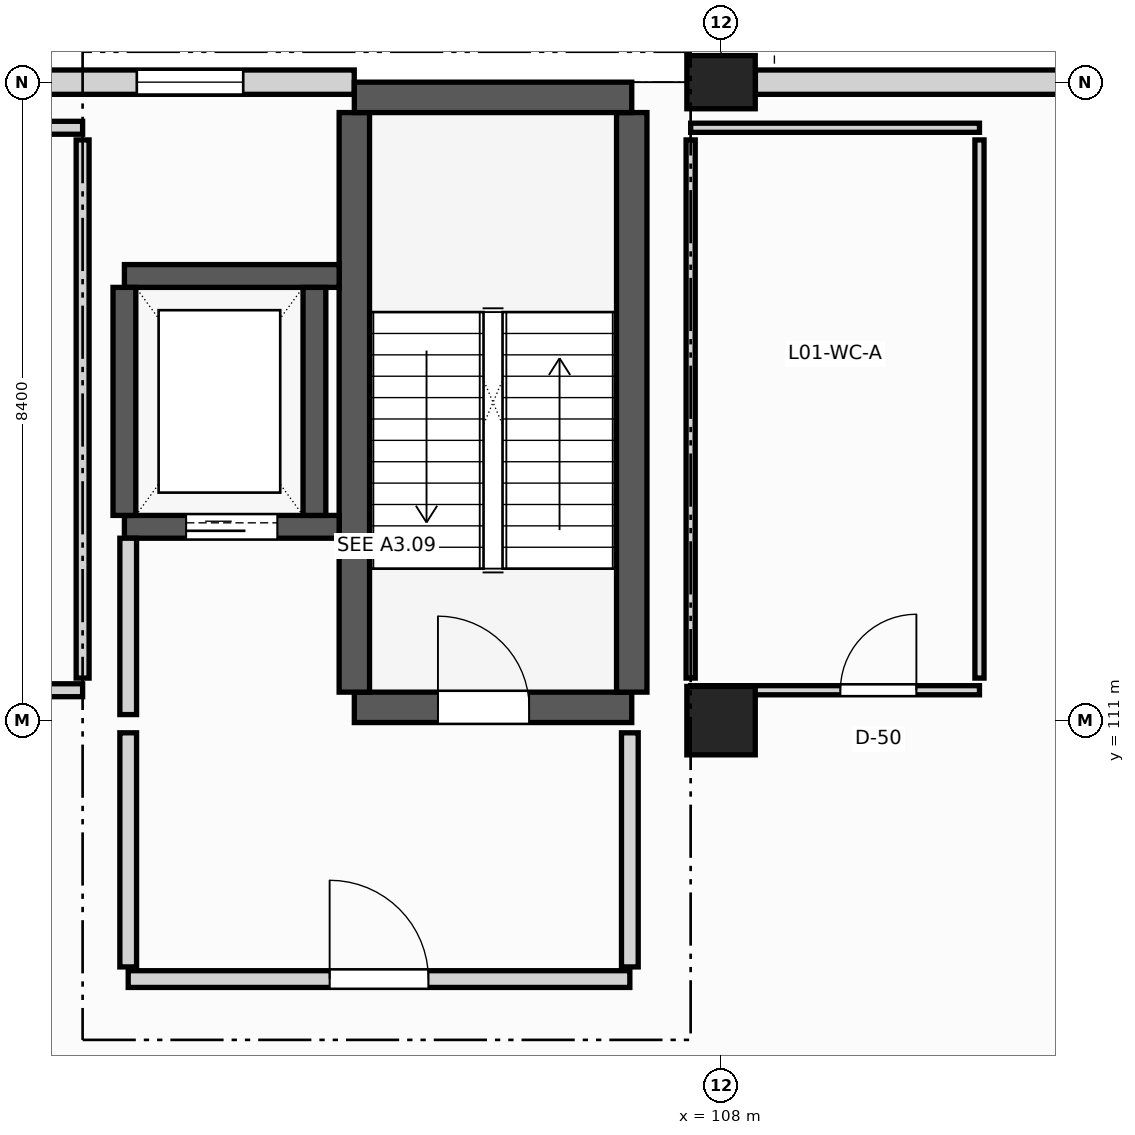
"""IFC4 building model, lengths in metres.
Left out: names, types, materials, properties, quantities, classifications, styles, units other than length and angle.
Written with IfcOpenShell. Run it as: python <this file> out.ifc"""

import sys

from ifc_helpers import new_model, si_unit, direction, frame, frame_2d, origin, origin_2d, place, context, subcontext, project, spatial, rectangle, extrude, element, fill, save


model = new_model("IFC4")
c1 = context("Model", 3, precision=1e-05, world=origin(), true_north=direction((0.0, 1.0)))
c2 = subcontext(c1, "Body", "Model", "MODEL_VIEW")
j1 = project(units=[si_unit("LENGTHUNIT", "METRE"), si_unit("PLANEANGLEUNIT", "RADIAN")], contexts=[c1])
p1 = place(None, origin())
s1 = spatial("IfcSite", under=j1, at=p1, CompositionType="ELEMENT")
p2 = place(p1, origin())
s2 = spatial("IfcBuilding", under=s1, at=p2, CompositionType="ELEMENT")
p3 = place(p2, frame((0.0, 0.0, 5.4)))
s3 = spatial("IfcBuildingStorey", under=s2, at=p3, CompositionType="ELEMENT", Elevation=5.4)
p4 = place(p3, frame((108.0, 111.0, 0.0), z_axis=(0.0, 0.0, 1.0), x_axis=(1.0, 0.0, 0.0)))
e1 = element("IfcColumn", 1, at=p4, inside=s3, PredefinedType="COLUMN", context=c2, shape_type="SweptSolid", body=[
    extrude(rectangle(XDim=0.9, YDim=0.9, at=origin_2d()), origin(), (0.0, 0.0, 1.0), 4.18),
])
p5 = place(p3, frame((108.0, 119.4, 0.0), z_axis=(0.0, 0.0, 1.0), x_axis=(1.0, 0.0, 0.0)))
e2 = element("IfcColumn", 2, at=p5, inside=s3, PredefinedType="COLUMN", context=c2, shape_type="SweptSolid", body=[
    extrude(rectangle(XDim=0.9, YDim=0.7, at=origin_2d()), origin(), (0.0, 0.0, 1.0), 4.18),
])
p6 = place(p3, frame((98.852, 119.4, 0.0), z_axis=(0.0, 0.0, 1.0), x_axis=(1.0, 0.0, 0.0)))
e3 = element("IfcWall", 3, at=p6, inside=s3, PredefinedType="SOLIDWALL", context=c2, shape_type="SweptSolid", body=[
    extrude(rectangle(XDim=4.322, YDim=0.32, at=frame_2d((2.161, 0.0))), origin(), (0.0, 0.0, 1.0), 3.38),
])
p7 = place(p6, frame((1.461, 0.0, 0.9)))
e4 = element("IfcOpeningElement", 4, at=p7, cuts=e3, PredefinedType="OPENING", context=c2, shape_type="SweptSolid", body=[
    extrude(rectangle(XDim=1.4, YDim=1.65, at=frame_2d((0.7, 0.825))), frame((0.0, 0.17, 0.0), z_axis=(0.0, -1.0, 0.0), x_axis=(1.0, 0.0, 0.0)), (0.0, 0.0, 1.0), 0.34),
])
p8 = place(p3, frame((108.452, 119.4, 0.0), z_axis=(0.0, 0.0, 1.0), x_axis=(1.0, 0.0, 0.0)))
e5 = element("IfcWall", 5, at=p8, inside=s3, PredefinedType="SOLIDWALL", context=c2, shape_type="SweptSolid", body=[
    extrude(rectangle(XDim=8.696, YDim=0.32, at=frame_2d((4.348, 0.0))), origin(), (0.0, 0.0, 1.0), 3.38),
])
p9 = place(p8, frame((5.648, 0.0, 0.85)))
e6 = element("IfcOpeningElement", 6, at=p9, cuts=e5, PredefinedType="OPENING", context=c2, shape_type="SweptSolid", body=[
    extrude(rectangle(XDim=1.4, YDim=1.65, at=frame_2d((0.7, 0.825))), frame((0.0, 0.17, 0.0), z_axis=(0.0, -1.0, 0.0), x_axis=(1.0, 0.0, 0.0)), (0.0, 0.0, 1.0), 0.34),
])
p10 = place(p3, frame((103.175, 111.175, 0.0), z_axis=(0.0, 0.0, 1.0), x_axis=(1.0, 0.0, 0.0)))
e7 = element("IfcWall", 7, at=p10, inside=s3, PredefinedType="SHEAR", context=c2, shape_type="SweptSolid", body=[
    extrude(rectangle(XDim=3.65, YDim=0.4, at=frame_2d((1.825, 0.0))), origin(), (0.0, 0.0, 1.0), 4.18),
])
p11 = place(p10, frame((1.1, 0.0, 0.0)))
e8 = element("IfcOpeningElement", 8, at=p11, cuts=e7, PredefinedType="OPENING", context=c2, shape_type="SweptSolid", body=[
    extrude(rectangle(XDim=1.2, YDim=2.2, at=frame_2d((0.6, 1.1))), frame((0.0, 0.21, 0.0), z_axis=(0.0, -1.0, 0.0), x_axis=(1.0, 0.0, 0.0)), (0.0, 0.0, 1.0), 0.42),
])
for number, where, z_axis, x_axis in (
    (9, (103.175, 111.375, 0.0), (0.0, 0.0, 1.0), (0.0, 1.0, 0.0)),
    (10, (106.825, 111.375, 0.0), (0.0, 0.0, 1.0), (0.0, 1.0, 0.0)),
):
    element("IfcWall", number, at=place(p3, frame(where, z_axis=z_axis, x_axis=x_axis)), inside=s3, PredefinedType="SHEAR", context=c2, shape_type="SweptSolid", body=[
        extrude(rectangle(XDim=7.625, YDim=0.4, at=frame_2d((3.812, 0.0))), origin(), (0.0, 0.0, 1.0), 4.18),
    ])
p12 = place(p3, frame((103.175, 119.2, 0.0), z_axis=(0.0, 0.0, 1.0), x_axis=(1.0, 0.0, 0.0)))
e11 = element("IfcWall", 11, at=p12, inside=s3, PredefinedType="SHEAR", context=c2, shape_type="SweptSolid", body=[
    extrude(rectangle(XDim=3.65, YDim=0.4, at=frame_2d((1.825, 0.0))), origin(), (0.0, 0.0, 1.0), 4.18),
])
p13 = place(p3, frame((100.15, 113.55, 0.0), z_axis=(0.0, 0.0, 1.0), x_axis=(1.0, 0.0, 0.0)))
e12 = element("IfcWall", 12, at=p13, inside=s3, PredefinedType="SHEAR", context=c2, shape_type="SweptSolid", body=[
    extrude(rectangle(XDim=2.825, YDim=0.3, at=frame_2d((1.413, 0.0))), origin(), (0.0, 0.0, 1.0), 4.18),
])
p14 = place(p13, frame((0.812, 0.0, 0.0)))
e13 = element("IfcOpeningElement", 13, at=p14, cuts=e12, PredefinedType="OPENING", context=c2, shape_type="SweptSolid", body=[
    extrude(rectangle(XDim=1.2, YDim=2.2, at=frame_2d((0.6, 1.1))), frame((0.0, 0.16, 0.0), z_axis=(0.0, -1.0, 0.0), x_axis=(1.0, 0.0, 0.0)), (0.0, 0.0, 1.0), 0.32),
])
p15 = place(p3, frame((100.15, 116.85, 0.0), z_axis=(0.0, 0.0, 1.0), x_axis=(1.0, 0.0, 0.0)))
e14 = element("IfcWall", 14, at=p15, inside=s3, PredefinedType="SHEAR", context=c2, shape_type="SweptSolid", body=[
    extrude(rectangle(XDim=2.825, YDim=0.3, at=frame_2d((1.413, 0.0))), origin(), (0.0, 0.0, 1.0), 4.18),
])
for number, where, z_axis, x_axis in (
    (15, (100.15, 113.7, 0.0), (0.0, 0.0, 1.0), (0.0, 1.0, 0.0)),
    (16, (102.65, 113.7, 0.0), (0.0, 0.0, 1.0), (0.0, 1.0, 0.0)),
):
    element("IfcWall", number, at=place(p3, frame(where, z_axis=z_axis, x_axis=x_axis)), inside=s3, PredefinedType="SHEAR", context=c2, shape_type="SweptSolid", body=[
        extrude(rectangle(XDim=3.0, YDim=0.3, at=frame_2d((1.5, 0.0))), origin(), (0.0, 0.0, 1.0), 4.18),
    ])
p16 = place(p3, frame((100.2, 107.6, 0.0), z_axis=(0.0, 0.0, 1.0), x_axis=(1.0, 0.0, 0.0)))
e17 = element("IfcWall", 17, at=p16, inside=s3, PredefinedType="PARTITIONING", context=c2, shape_type="SweptSolid", body=[
    extrude(rectangle(XDim=6.6, YDim=0.22, at=frame_2d((3.3, 0.0))), origin(), (0.0, 0.0, 1.0), 3.22),
])
p17 = place(p16, frame((2.65, 0.0, 0.0)))
e18 = element("IfcOpeningElement", 18, at=p17, cuts=e17, PredefinedType="OPENING", context=c2, shape_type="SweptSolid", body=[
    extrude(rectangle(XDim=1.3, YDim=2.2, at=frame_2d((0.65, 1.1))), frame((0.0, 0.12, 0.0), z_axis=(0.0, -1.0, 0.0), x_axis=(1.0, 0.0, 0.0)), (0.0, 0.0, 1.0), 0.24),
])
p18 = place(p3, frame((100.2, 111.08, 0.0), z_axis=(0.0, 0.0, 1.0), x_axis=(0.0, 1.0, 0.0)))
e19 = element("IfcWall", 19, at=p18, inside=s3, PredefinedType="PARTITIONING", context=c2, shape_type="SweptSolid", body=[
    extrude(rectangle(XDim=2.32, YDim=0.22, at=frame_2d((1.16, 0.0))), origin(), (0.0, 0.0, 1.0), 3.22),
])
for number, where, z_axis, x_axis in (
    (20, (100.2, 107.76, 0.0), (0.0, 0.0, 1.0), (0.0, 1.0, 0.0)),
    (21, (106.8, 107.76, 0.0), (0.0, 0.0, 1.0), (0.0, 1.0, 0.0)),
):
    element("IfcWall", number, at=place(p3, frame(where, z_axis=z_axis, x_axis=x_axis)), inside=s3, PredefinedType="PARTITIONING", context=c2, shape_type="SweptSolid", body=[
        extrude(rectangle(XDim=3.08, YDim=0.22, at=frame_2d((1.54, 0.0))), origin(), (0.0, 0.0, 1.0), 3.22),
    ])
p19 = place(p3, frame((78.2, 111.4, 0.0), z_axis=(0.0, 0.0, 1.0), x_axis=(1.0, 0.0, 0.0)))
e22 = element("IfcWall", 22, at=p19, inside=s3, PredefinedType="PARTITIONING", context=c2, shape_type="SweptSolid", body=[
    extrude(rectangle(XDim=21.4, YDim=0.17, at=frame_2d((10.7, 0.0))), origin(), (0.0, 0.0, 1.0), 3.22),
])
p20 = place(p19, frame((6.94, 0.0, 0.0)))
e23 = element("IfcOpeningElement", 23, at=p20, cuts=e22, PredefinedType="OPENING", context=c2, shape_type="SweptSolid", body=[
    extrude(rectangle(XDim=1.1, YDim=2.2, at=frame_2d((0.55, 1.1))), frame((0.0, 0.095, 0.0), z_axis=(0.0, -1.0, 0.0), x_axis=(1.0, 0.0, 0.0)), (0.0, 0.0, 1.0), 0.19),
])
p21 = place(p3, frame((78.2, 118.8, 0.0), z_axis=(0.0, 0.0, 1.0), x_axis=(1.0, 0.0, 0.0)))
e24 = element("IfcWall", 24, at=p21, inside=s3, PredefinedType="PARTITIONING", context=c2, shape_type="SweptSolid", body=[
    extrude(rectangle(XDim=21.4, YDim=0.17, at=frame_2d((10.7, 0.0))), origin(), (0.0, 0.0, 1.0), 3.22),
])
p22 = place(p3, frame((99.6, 111.56, 0.0), z_axis=(0.0, 0.0, 1.0), x_axis=(0.0, 1.0, 0.0)))
e25 = element("IfcWall", 25, at=p22, inside=s3, PredefinedType="PARTITIONING", context=c2, shape_type="SweptSolid", body=[
    extrude(rectangle(XDim=7.08, YDim=0.17, at=frame_2d((3.54, 0.0))), origin(), (0.0, 0.0, 1.0), 3.22),
])
p23 = place(p3, frame((107.6, 111.4, 0.0), z_axis=(0.0, 0.0, 1.0), x_axis=(1.0, 0.0, 0.0)))
e26 = element("IfcWall", 26, at=p23, inside=s3, PredefinedType="PARTITIONING", context=c2, shape_type="SweptSolid", body=[
    extrude(rectangle(XDim=3.8, YDim=0.12, at=frame_2d((1.9, 0.0))), origin(), (0.0, 0.0, 1.0), 3.22),
])
p24 = place(p23, frame((1.97, 0.0, 0.0)))
e27 = element("IfcOpeningElement", 27, at=p24, cuts=e26, PredefinedType="OPENING", context=c2, shape_type="SweptSolid", body=[
    extrude(rectangle(XDim=1.0, YDim=2.15, at=frame_2d((0.5, 1.075))), frame((0.0, 0.07, 0.0), z_axis=(0.0, -1.0, 0.0), x_axis=(1.0, 0.0, 0.0)), (0.0, 0.0, 1.0), 0.14),
])
p25 = place(p3, frame((107.6, 118.8, 0.0), z_axis=(0.0, 0.0, 1.0), x_axis=(1.0, 0.0, 0.0)))
e28 = element("IfcWall", 28, at=p25, inside=s3, PredefinedType="PARTITIONING", context=c2, shape_type="SweptSolid", body=[
    extrude(rectangle(XDim=3.8, YDim=0.12, at=frame_2d((1.9, 0.0))), origin(), (0.0, 0.0, 1.0), 3.22),
])
for number, where, z_axis, x_axis in (
    (29, (107.6, 111.56, 0.0), (0.0, 0.0, 1.0), (0.0, 1.0, 0.0)),
    (30, (111.4, 111.56, 0.0), (0.0, 0.0, 1.0), (0.0, 1.0, 0.0)),
):
    element("IfcWall", number, at=place(p3, frame(where, z_axis=z_axis, x_axis=x_axis)), inside=s3, PredefinedType="PARTITIONING", context=c2, shape_type="SweptSolid", body=[
        extrude(rectangle(XDim=7.08, YDim=0.12, at=frame_2d((3.54, 0.0))), origin(), (0.0, 0.0, 1.0), 3.22),
    ])
p26 = place(p7, origin())
e31 = element("IfcWindow", 31, at=p26, inside=s3, PartitioningType="SINGLE_PANEL", PredefinedType="WINDOW", context=c2, shape_type="SweptSolid", body=[
    extrude(rectangle(XDim=1.4, YDim=1.65, at=frame_2d((0.7, 0.825))), frame((0.0, 0.03, 0.0), z_axis=(0.0, -1.0, 0.0), x_axis=(1.0, 0.0, 0.0)), (0.0, 0.0, 1.0), 0.06),
])
fill(e4, e31)
p27 = place(p11, origin())
e32 = element("IfcDoor", 32, at=p27, inside=s3, OperationType="SINGLE_SWING_LEFT", PredefinedType="DOOR", context=c2, shape_type="SweptSolid", body=[
    extrude(rectangle(XDim=1.2, YDim=2.2, at=frame_2d((0.6, 1.1))), frame((0.0, 0.025, 0.0), z_axis=(0.0, -1.0, 0.0), x_axis=(1.0, 0.0, 0.0)), (0.0, 0.0, 1.0), 0.05),
])
fill(e8, e32)
p28 = place(p14, origin())
e33 = element("IfcDoor", 33, at=p28, inside=s3, OperationType="SLIDING_TO_LEFT", PredefinedType="DOOR", context=c2, shape_type="SweptSolid", body=[
    extrude(rectangle(XDim=1.2, YDim=2.2, at=frame_2d((0.6, 1.1))), frame((0.0, 0.025, 0.0), z_axis=(0.0, -1.0, 0.0), x_axis=(1.0, 0.0, 0.0)), (0.0, 0.0, 1.0), 0.05),
])
fill(e13, e33)
p29 = place(p17, origin())
e34 = element("IfcDoor", 34, at=p29, inside=s3, OperationType="SINGLE_SWING_LEFT", PredefinedType="DOOR", context=c2, shape_type="SweptSolid", body=[
    extrude(rectangle(XDim=1.3, YDim=2.2, at=frame_2d((0.65, 1.1))), frame((0.0, 0.025, 0.0), z_axis=(0.0, -1.0, 0.0), x_axis=(1.0, 0.0, 0.0)), (0.0, 0.0, 1.0), 0.05),
])
fill(e18, e34)
p30 = place(p24, origin())
e35 = element("IfcDoor", 35, at=p30, inside=s3, OperationType="SINGLE_SWING_RIGHT", PredefinedType="DOOR", context=c2, shape_type="SweptSolid", body=[
    extrude(rectangle(XDim=1.0, YDim=2.15, at=frame_2d((0.5, 1.075))), frame((0.0, 0.025, 0.0), z_axis=(0.0, -1.0, 0.0), x_axis=(1.0, 0.0, 0.0)), (0.0, 0.0, 1.0), 0.05),
])
fill(e27, e35)
save(model, sys.argv[1])
